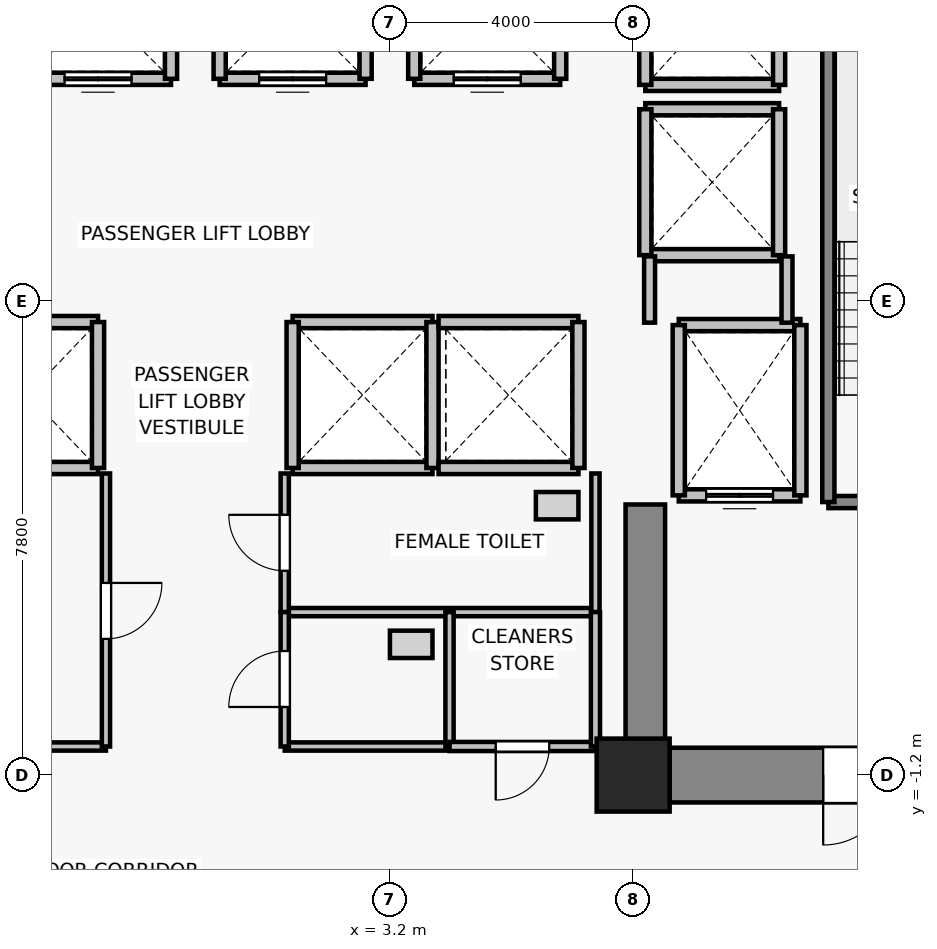
"""IFC4 building model, lengths in metres.
Left out: names, types, materials, properties, quantities, classifications, styles, units other than length and angle.
Written with IfcOpenShell. Run it as: python <this file> out.ifc"""

import sys

from ifc_helpers import new_model, si_unit, direction, frame, frame_2d, origin, origin_2d, place, context, subcontext, project, spatial, rectangle, extrude, source, transform, mapped, element, fill, save


model = new_model("IFC4")
c1 = context("Model", 3, precision=1e-05, world=origin(), true_north=direction((0.0, 1.0)))
c2 = subcontext(c1, "Body", "Model", "MODEL_VIEW")
j1 = project(units=[si_unit("LENGTHUNIT", "METRE"), si_unit("PLANEANGLEUNIT", "RADIAN")], contexts=[c1])
p1 = place(None, origin())
s1 = spatial("IfcSite", under=j1, at=p1, CompositionType="ELEMENT")
p2 = place(p1, origin())
s2 = spatial("IfcBuilding", under=s1, at=p2, CompositionType="ELEMENT")
p3 = place(p2, frame((0.0, 0.0, 60.4)))
s3 = spatial("IfcBuildingStorey", under=s2, at=p3, CompositionType="ELEMENT", Elevation=60.4)
p4 = place(p3, frame((7.2, -1.2, 0.0), z_axis=(0.0, 0.0, 1.0), x_axis=(1.0, 0.0, 0.0)))
e1 = element("IfcColumn", 1, at=p4, inside=s3, PredefinedType="COLUMN", context=c2, shape_type="SweptSolid", body=[
    extrude(rectangle(XDim=1.2, YDim=1.2, at=origin_2d()), origin(), (0.0, 0.0, 1.0), 3.3),
])
p5 = place(p3, frame((13.8, -1.2, 0.0), z_axis=(0.0, 0.0, 1.0), x_axis=(-1.0, 0.0, 0.0)))
e2 = element("IfcWall", 2, at=p5, inside=s3, PredefinedType="SHEAR", context=c2, shape_type="SweptSolid", body=[
    extrude(rectangle(XDim=6.0, YDim=0.9, at=frame_2d((3.0, 0.0))), origin(), (0.0, 0.0, 1.0), 3.075),
])
p6 = place(p5, frame((2.325, 0.0, 0.0)))
e3 = element("IfcOpeningElement", 3, at=p6, cuts=e2, PredefinedType="OPENING", context=c2, shape_type="SweptSolid", body=[
    extrude(rectangle(XDim=1.15, YDim=2.15, at=frame_2d((0.575, 1.075))), frame((0.0, 0.46, 0.0), z_axis=(0.0, -1.0, 0.0), x_axis=(1.0, 0.0, 0.0)), (0.0, 0.0, 1.0), 0.92),
])
p7 = place(p3, frame((7.4, -0.75, 0.0), z_axis=(0.0, 0.0, 1.0), x_axis=(0.0, 1.0, 0.0)))
e4 = element("IfcWall", 4, at=p7, inside=s3, PredefinedType="SHEAR", context=c2, shape_type="SweptSolid", body=[
    extrude(rectangle(XDim=4.0, YDim=0.65, at=frame_2d((2.0, 0.0))), origin(), (0.0, 0.0, 1.0), 3.075),
])
p8 = place(p3, frame((9.95, 3.4, 0.0), z_axis=(0.0, 0.0, 1.0), x_axis=(-1.0, 0.0, 0.0)))
e5 = element("IfcWall", 5, at=p8, inside=s3, PredefinedType="SOLIDWALL", context=c2, shape_type="SweptSolid", body=[
    extrude(rectangle(XDim=2.0, YDim=0.2, at=frame_2d((1.0, 0.0))), origin(), (0.0, 0.0, 1.0), 3.075),
])
p9 = place(p8, frame((0.45, 0.0, 0.0)))
e6 = element("IfcOpeningElement", 6, at=p9, cuts=e5, PredefinedType="OPENING", context=c2, shape_type="SweptSolid", body=[
    extrude(rectangle(XDim=1.1, YDim=2.2, at=frame_2d((0.55, 1.1))), frame((0.0, 0.11, 0.0), z_axis=(0.0, -1.0, 0.0), x_axis=(1.0, 0.0, 0.0)), (0.0, 0.0, 1.0), 0.22),
])
p10 = place(p3, frame((7.95, 6.2, 0.0), z_axis=(0.0, 0.0, 1.0), x_axis=(1.0, 0.0, 0.0)))
e7 = element("IfcWall", 7, at=p10, inside=s3, PredefinedType="SOLIDWALL", context=c2, shape_type="SweptSolid", body=[
    extrude(rectangle(XDim=2.0, YDim=0.2, at=frame_2d((1.0, 0.0))), origin(), (0.0, 0.0, 1.0), 3.075),
])
for number, where, z_axis, x_axis in (
    (8, (7.95, 3.4, 0.0), (0.0, 0.0, 1.0), (0.0, 1.0, 0.0)),
    (9, (9.95, 6.2, 0.0), (0.0, 0.0, 1.0), (0.0, -1.0, 0.0)),
):
    element("IfcWall", number, at=place(p3, frame(where, z_axis=z_axis, x_axis=x_axis)), inside=s3, PredefinedType="SOLIDWALL", context=c2, shape_type="SweptSolid", body=[
        extrude(rectangle(XDim=2.8, YDim=0.2, at=frame_2d((1.4, 0.0))), origin(), (0.0, 0.0, 1.0), 3.075),
    ])
p11 = place(p3, frame((-0.4, 10.25, 0.0), z_axis=(0.0, 0.0, 1.0), x_axis=(-1.0, 0.0, 0.0)))
e10 = element("IfcWall", 10, at=p11, inside=s3, PredefinedType="SOLIDWALL", context=c2, shape_type="SweptSolid", body=[
    extrude(rectangle(XDim=2.4, YDim=0.2, at=frame_2d((1.2, 0.0))), origin(), (0.0, 0.0, 1.0), 3.075),
])
p12 = place(p11, frame((0.65, 0.0, 0.0)))
e11 = element("IfcOpeningElement", 11, at=p12, cuts=e10, PredefinedType="OPENING", context=c2, shape_type="SweptSolid", body=[
    extrude(rectangle(XDim=1.1, YDim=2.2, at=frame_2d((0.55, 1.1))), frame((0.0, 0.11, 0.0), z_axis=(0.0, -1.0, 0.0), x_axis=(1.0, 0.0, 0.0)), (0.0, 0.0, 1.0), 0.22),
])
p13 = place(p3, frame((-0.4, 12.65, 0.0), z_axis=(0.0, 0.0, 1.0), x_axis=(0.0, -1.0, 0.0)))
e12 = element("IfcWall", 12, at=p13, inside=s3, PredefinedType="SOLIDWALL", context=c2, shape_type="SweptSolid", body=[
    extrude(rectangle(XDim=2.4, YDim=0.2, at=frame_2d((1.2, 0.0))), origin(), (0.0, 0.0, 1.0), 3.075),
])
p14 = place(p3, frame((2.8, 10.25, 0.0), z_axis=(0.0, 0.0, 1.0), x_axis=(-1.0, 0.0, 0.0)))
e13 = element("IfcWall", 13, at=p14, inside=s3, PredefinedType="SOLIDWALL", context=c2, shape_type="SweptSolid", body=[
    extrude(rectangle(XDim=2.4, YDim=0.2, at=frame_2d((1.2, 0.0))), origin(), (0.0, 0.0, 1.0), 3.075),
])
p15 = place(p14, frame((0.65, 0.0, 0.0)))
e14 = element("IfcOpeningElement", 14, at=p15, cuts=e13, PredefinedType="OPENING", context=c2, shape_type="SweptSolid", body=[
    extrude(rectangle(XDim=1.1, YDim=2.2, at=frame_2d((0.55, 1.1))), frame((0.0, 0.11, 0.0), z_axis=(0.0, -1.0, 0.0), x_axis=(1.0, 0.0, 0.0)), (0.0, 0.0, 1.0), 0.22),
])
for number, where, z_axis, x_axis in (
    (15, (0.4, 10.25, 0.0), (0.0, 0.0, 1.0), (0.0, 1.0, 0.0)),
    (16, (2.8, 12.65, 0.0), (0.0, 0.0, 1.0), (0.0, -1.0, 0.0)),
):
    element("IfcWall", number, at=place(p3, frame(where, z_axis=z_axis, x_axis=x_axis)), inside=s3, PredefinedType="SOLIDWALL", context=c2, shape_type="SweptSolid", body=[
        extrude(rectangle(XDim=2.4, YDim=0.2, at=frame_2d((1.2, 0.0))), origin(), (0.0, 0.0, 1.0), 3.075),
    ])
p16 = place(p3, frame((6.0, 10.25, 0.0), z_axis=(0.0, 0.0, 1.0), x_axis=(-1.0, 0.0, 0.0)))
e17 = element("IfcWall", 17, at=p16, inside=s3, PredefinedType="SOLIDWALL", context=c2, shape_type="SweptSolid", body=[
    extrude(rectangle(XDim=2.4, YDim=0.2, at=frame_2d((1.2, 0.0))), origin(), (0.0, 0.0, 1.0), 3.075),
])
p17 = place(p16, frame((0.65, 0.0, 0.0)))
e18 = element("IfcOpeningElement", 18, at=p17, cuts=e17, PredefinedType="OPENING", context=c2, shape_type="SweptSolid", body=[
    extrude(rectangle(XDim=1.1, YDim=2.2, at=frame_2d((0.55, 1.1))), frame((0.0, 0.11, 0.0), z_axis=(0.0, -1.0, 0.0), x_axis=(1.0, 0.0, 0.0)), (0.0, 0.0, 1.0), 0.22),
])
for number, where, z_axis, x_axis in (
    (19, (3.6, 10.25, 0.0), (0.0, 0.0, 1.0), (0.0, 1.0, 0.0)),
    (20, (6.0, 12.65, 0.0), (0.0, 0.0, 1.0), (0.0, -1.0, 0.0)),
):
    element("IfcWall", number, at=place(p3, frame(where, z_axis=z_axis, x_axis=x_axis)), inside=s3, PredefinedType="SOLIDWALL", context=c2, shape_type="SweptSolid", body=[
        extrude(rectangle(XDim=2.4, YDim=0.2, at=frame_2d((1.2, 0.0))), origin(), (0.0, 0.0, 1.0), 3.075),
    ])
for number, where, z_axis, x_axis in (
    (21, (-1.6, 3.85, 0.0), (0.0, 0.0, 1.0), (-1.0, 0.0, 0.0)),
    (22, (-3.9, 6.25, 0.0), (0.0, 0.0, 1.0), (1.0, 0.0, 0.0)),
):
    element("IfcWall", number, at=place(p3, frame(where, z_axis=z_axis, x_axis=x_axis)), inside=s3, PredefinedType="SOLIDWALL", context=c2, shape_type="SweptSolid", body=[
        extrude(rectangle(XDim=2.3, YDim=0.2, at=frame_2d((1.15, 0.0))), origin(), (0.0, 0.0, 1.0), 3.075),
    ])
p18 = place(p3, frame((-1.6, 6.25, 0.0), z_axis=(0.0, 0.0, 1.0), x_axis=(0.0, -1.0, 0.0)))
e23 = element("IfcWall", 23, at=p18, inside=s3, PredefinedType="SOLIDWALL", context=c2, shape_type="SweptSolid", body=[
    extrude(rectangle(XDim=2.4, YDim=0.2, at=frame_2d((1.2, 0.0))), origin(), (0.0, 0.0, 1.0), 3.075),
])
for number, where, z_axis, x_axis in (
    (24, (3.9, 3.85, 0.0), (0.0, 0.0, 1.0), (-1.0, 0.0, 0.0)),
    (25, (1.6, 6.25, 0.0), (0.0, 0.0, 1.0), (1.0, 0.0, 0.0)),
):
    element("IfcWall", number, at=place(p3, frame(where, z_axis=z_axis, x_axis=x_axis)), inside=s3, PredefinedType="SOLIDWALL", context=c2, shape_type="SweptSolid", body=[
        extrude(rectangle(XDim=2.3, YDim=0.2, at=frame_2d((1.15, 0.0))), origin(), (0.0, 0.0, 1.0), 3.075),
    ])
for number, where, z_axis, x_axis in (
    (26, (1.6, 3.85, 0.0), (0.0, 0.0, 1.0), (0.0, 1.0, 0.0)),
    (27, (3.9, 6.25, 0.0), (0.0, 0.0, 1.0), (0.0, -1.0, 0.0)),
):
    element("IfcWall", number, at=place(p3, frame(where, z_axis=z_axis, x_axis=x_axis)), inside=s3, PredefinedType="SOLIDWALL", context=c2, shape_type="SweptSolid", body=[
        extrude(rectangle(XDim=2.4, YDim=0.2, at=frame_2d((1.2, 0.0))), origin(), (0.0, 0.0, 1.0), 3.075),
    ])
for number, where, z_axis, x_axis in (
    (28, (6.3, 3.85, 0.0), (0.0, 0.0, 1.0), (-1.0, 0.0, 0.0)),
    (29, (4.0, 6.25, 0.0), (0.0, 0.0, 1.0), (1.0, 0.0, 0.0)),
):
    element("IfcWall", number, at=place(p3, frame(where, z_axis=z_axis, x_axis=x_axis)), inside=s3, PredefinedType="SOLIDWALL", context=c2, shape_type="SweptSolid", body=[
        extrude(rectangle(XDim=2.3, YDim=0.2, at=frame_2d((1.15, 0.0))), origin(), (0.0, 0.0, 1.0), 3.075),
    ])
p19 = place(p3, frame((6.3, 6.25, 0.0), z_axis=(0.0, 0.0, 1.0), x_axis=(0.0, -1.0, 0.0)))
e30 = element("IfcWall", 30, at=p19, inside=s3, PredefinedType="SOLIDWALL", context=c2, shape_type="SweptSolid", body=[
    extrude(rectangle(XDim=2.4, YDim=0.2, at=frame_2d((1.2, 0.0))), origin(), (0.0, 0.0, 1.0), 3.075),
])
for number, where, z_axis, x_axis in (
    (31, (9.6, 7.35, 0.0), (0.0, 0.0, 1.0), (-1.0, 0.0, 0.0)),
    (32, (7.4, 9.75, 0.0), (0.0, 0.0, 1.0), (1.0, 0.0, 0.0)),
):
    element("IfcWall", number, at=place(p3, frame(where, z_axis=z_axis, x_axis=x_axis)), inside=s3, PredefinedType="SOLIDWALL", context=c2, shape_type="SweptSolid", body=[
        extrude(rectangle(XDim=2.2, YDim=0.2, at=frame_2d((1.1, 0.0))), origin(), (0.0, 0.0, 1.0), 2.465),
    ])
p20 = place(p3, frame((7.4, 7.35, 0.0), z_axis=(0.0, 0.0, 1.0), x_axis=(0.0, 1.0, 0.0)))
e33 = element("IfcWall", 33, at=p20, inside=s3, PredefinedType="SOLIDWALL", context=c2, shape_type="SweptSolid", body=[
    extrude(rectangle(XDim=2.4, YDim=0.2, at=frame_2d((1.2, 0.0))), origin(), (0.0, 0.0, 1.0), 2.465),
])
p21 = place(p3, frame((9.6, 9.75, 0.0), z_axis=(0.0, 0.0, 1.0), x_axis=(0.0, -1.0, 0.0)))
e34 = element("IfcWall", 34, at=p21, inside=s3, PredefinedType="SOLIDWALL", context=c2, shape_type="SweptSolid", body=[
    extrude(rectangle(XDim=2.4, YDim=0.2, at=frame_2d((1.2, 0.0))), origin(), (0.0, 0.0, 1.0), 3.075),
])
p22 = place(p3, frame((9.6, 10.15, 0.0), z_axis=(0.0, 0.0, 1.0), x_axis=(-1.0, 0.0, 0.0)))
e35 = element("IfcWall", 35, at=p22, inside=s3, PredefinedType="SOLIDWALL", context=c2, shape_type="SweptSolid", body=[
    extrude(rectangle(XDim=2.2, YDim=0.2, at=frame_2d((1.1, 0.0))), origin(), (0.0, 0.0, 1.0), 2.465),
])
p23 = place(p3, frame((7.4, 10.15, 0.0), z_axis=(0.0, 0.0, 1.0), x_axis=(0.0, 1.0, 0.0)))
e36 = element("IfcWall", 36, at=p23, inside=s3, PredefinedType="SOLIDWALL", context=c2, shape_type="SweptSolid", body=[
    extrude(rectangle(XDim=2.4, YDim=0.2, at=frame_2d((1.2, 0.0))), origin(), (0.0, 0.0, 1.0), 2.465),
])
p24 = place(p3, frame((9.6, 12.55, 0.0), z_axis=(0.0, 0.0, 1.0), x_axis=(0.0, -1.0, 0.0)))
e37 = element("IfcWall", 37, at=p24, inside=s3, PredefinedType="SOLIDWALL", context=c2, shape_type="SweptSolid", body=[
    extrude(rectangle(XDim=2.4, YDim=0.2, at=frame_2d((1.2, 0.0))), origin(), (0.0, 0.0, 1.0), 3.075),
])
p25 = place(p3, frame((13.93, 3.29, 0.0), z_axis=(0.0, 0.0, 1.0), x_axis=(-1.0, 0.0, 0.0)))
e38 = element("IfcWall", 38, at=p25, inside=s3, PredefinedType="SOLIDWALL", context=c2, shape_type="SweptSolid", body=[
    extrude(rectangle(XDim=3.52, YDim=0.2, at=frame_2d((1.76, 0.0))), origin(), (0.0, 0.0, 1.0), 3.075),
])
p26 = place(p25, frame((1.205, 0.0, 0.0)))
e39 = element("IfcOpeningElement", 39, at=p26, cuts=e38, PredefinedType="OPENING", context=c2, shape_type="SweptSolid", body=[
    extrude(rectangle(XDim=1.15, YDim=2.15, at=frame_2d((0.575, 1.075))), frame((0.0, 0.11, 0.0), z_axis=(0.0, -1.0, 0.0), x_axis=(1.0, 0.0, 0.0)), (0.0, 0.0, 1.0), 0.22),
])
p27 = place(p3, frame((10.41, 3.29, 0.0), z_axis=(0.0, 0.0, 1.0), x_axis=(0.0, 1.0, 0.0)))
e40 = element("IfcWall", 40, at=p27, inside=s3, PredefinedType="SOLIDWALL", context=c2, shape_type="SweptSolid", body=[
    extrude(rectangle(XDim=8.84, YDim=0.2, at=frame_2d((4.42, 0.0))), origin(), (0.0, 0.0, 1.0), 3.075),
])
p28 = place(p3, frame((7.47, 6.24, 0.0), z_axis=(0.0, 0.0, 1.0), x_axis=(0.0, 1.0, 0.0)))
e41 = element("IfcWall", 41, at=p28, inside=s3, PredefinedType="PARTITIONING", context=c2, shape_type="SweptSolid", body=[
    extrude(rectangle(XDim=1.09, YDim=0.18, at=frame_2d((0.545, 0.0))), origin(), (0.0, 0.0, 1.0), 2.465),
])
p29 = place(p3, frame((9.73, 7.33, 0.0), z_axis=(0.0, 0.0, 1.0), x_axis=(0.0, -1.0, 0.0)))
e42 = element("IfcWall", 42, at=p29, inside=s3, PredefinedType="PARTITIONING", context=c2, shape_type="SweptSolid", body=[
    extrude(rectangle(XDim=1.09, YDim=0.18, at=frame_2d((0.545, 0.0))), origin(), (0.0, 0.0, 1.0), 3.075),
])
p30 = place(p3, frame((-1.47, -0.73, 0.0), z_axis=(0.0, 0.0, 1.0), x_axis=(-1.0, 0.0, 0.0)))
e43 = element("IfcWall", 43, at=p30, inside=s3, PredefinedType="PARTITIONING", context=c2, shape_type="SweptSolid", body=[
    extrude(rectangle(XDim=5.11, YDim=0.135, at=frame_2d((2.555, 0.0))), origin(), (0.0, 0.0, 1.0), 3.075),
])
p31 = place(p3, frame((-1.47, 3.76, 0.0), z_axis=(0.0, 0.0, 1.0), x_axis=(0.0, -1.0, 0.0)))
e44 = element("IfcWall", 44, at=p31, inside=s3, PredefinedType="PARTITIONING", context=c2, shape_type="SweptSolid", body=[
    extrude(rectangle(XDim=4.49, YDim=0.135, at=frame_2d((2.245, 0.0))), origin(), (0.0, 0.0, 1.0), 3.075),
])
p32 = place(p31, frame((1.8, 0.0, 0.0)))
e45 = element("IfcOpeningElement", 45, at=p32, cuts=e44, PredefinedType="OPENING", context=c2, shape_type="SweptSolid", body=[
    extrude(rectangle(XDim=0.92, YDim=2.1, at=frame_2d((0.46, 1.05))), frame((0.0, 0.077, 0.0), z_axis=(0.0, -1.0, 0.0), x_axis=(1.0, 0.0, 0.0)), (0.0, 0.0, 1.0), 0.155),
])
p33 = place(p3, frame((6.58, 1.48, 0.0), z_axis=(0.0, 0.0, 1.0), x_axis=(-1.0, 0.0, 0.0)))
e46 = element("IfcWall", 46, at=p33, inside=s3, PredefinedType="PARTITIONING", context=c2, shape_type="SweptSolid", body=[
    extrude(rectangle(XDim=5.11, YDim=0.135, at=frame_2d((2.555, 0.0))), origin(), (0.0, 0.0, 1.0), 3.075),
])
p34 = place(p3, frame((1.47, 1.48, 0.0), z_axis=(0.0, 0.0, 1.0), x_axis=(0.0, 1.0, 0.0)))
e47 = element("IfcWall", 47, at=p34, inside=s3, PredefinedType="PARTITIONING", context=c2, shape_type="SweptSolid", body=[
    extrude(rectangle(XDim=2.28, YDim=0.135, at=frame_2d((1.14, 0.0))), origin(), (0.0, 0.0, 1.0), 3.075),
])
p35 = place(p34, frame((0.68, 0.0, 0.0)))
e48 = element("IfcOpeningElement", 48, at=p35, cuts=e47, PredefinedType="OPENING", context=c2, shape_type="SweptSolid", body=[
    extrude(rectangle(XDim=0.92, YDim=2.1, at=frame_2d((0.46, 1.05))), frame((0.0, 0.077, 0.0), z_axis=(0.0, -1.0, 0.0), x_axis=(1.0, 0.0, 0.0)), (0.0, 0.0, 1.0), 0.155),
])
p36 = place(p3, frame((6.58, 3.76, 0.0), z_axis=(0.0, 0.0, 1.0), x_axis=(0.0, -1.0, 0.0)))
e49 = element("IfcWall", 49, at=p36, inside=s3, PredefinedType="PARTITIONING", context=c2, shape_type="SweptSolid", body=[
    extrude(rectangle(XDim=2.28, YDim=0.135, at=frame_2d((1.14, 0.0))), origin(), (0.0, 0.0, 1.0), 3.075),
])
p37 = place(p3, frame((4.18, -0.73, 0.0), z_axis=(0.0, 0.0, 1.0), x_axis=(-1.0, 0.0, 0.0)))
e50 = element("IfcWall", 50, at=p37, inside=s3, PredefinedType="PARTITIONING", context=c2, shape_type="SweptSolid", body=[
    extrude(rectangle(XDim=2.71, YDim=0.135, at=frame_2d((1.355, 0.0))), origin(), (0.0, 0.0, 1.0), 3.075),
])
p38 = place(p3, frame((1.47, -0.73, 0.0), z_axis=(0.0, 0.0, 1.0), x_axis=(0.0, 1.0, 0.0)))
e51 = element("IfcWall", 51, at=p38, inside=s3, PredefinedType="PARTITIONING", context=c2, shape_type="SweptSolid", body=[
    extrude(rectangle(XDim=2.21, YDim=0.135, at=frame_2d((1.105, 0.0))), origin(), (0.0, 0.0, 1.0), 3.075),
])
p39 = place(p38, frame((0.65, 0.0, 0.0)))
e52 = element("IfcOpeningElement", 52, at=p39, cuts=e51, PredefinedType="OPENING", context=c2, shape_type="SweptSolid", body=[
    extrude(rectangle(XDim=0.92, YDim=2.1, at=frame_2d((0.46, 1.05))), frame((0.0, 0.077, 0.0), z_axis=(0.0, -1.0, 0.0), x_axis=(1.0, 0.0, 0.0)), (0.0, 0.0, 1.0), 0.155),
])
p40 = place(p3, frame((4.18, 1.48, 0.0), z_axis=(0.0, 0.0, 1.0), x_axis=(0.0, -1.0, 0.0)))
e53 = element("IfcWall", 53, at=p40, inside=s3, PredefinedType="PARTITIONING", context=c2, shape_type="SweptSolid", body=[
    extrude(rectangle(XDim=2.21, YDim=0.135, at=frame_2d((1.105, 0.0))), origin(), (0.0, 0.0, 1.0), 3.075),
])
p41 = place(p3, frame((6.58, -0.73, 0.0), z_axis=(0.0, 0.0, 1.0), x_axis=(-1.0, 0.0, 0.0)))
e54 = element("IfcWall", 54, at=p41, inside=s3, PredefinedType="PARTITIONING", context=c2, shape_type="SweptSolid", body=[
    extrude(rectangle(XDim=2.4, YDim=0.15, at=frame_2d((1.2, 0.0))), origin(), (0.0, 0.0, 1.0), 3.075),
])
p42 = place(p41, frame((0.76, 0.0, 0.0)))
e55 = element("IfcOpeningElement", 55, at=p42, cuts=e54, PredefinedType="OPENING", context=c2, shape_type="SweptSolid", body=[
    extrude(rectangle(XDim=0.88, YDim=2.1, at=frame_2d((0.44, 1.05))), frame((0.0, 0.085, 0.0), z_axis=(0.0, -1.0, 0.0), x_axis=(1.0, 0.0, 0.0)), (0.0, 0.0, 1.0), 0.17),
])
p43 = place(p3, frame((6.58, 1.48, 0.0), z_axis=(0.0, 0.0, 1.0), x_axis=(0.0, -1.0, 0.0)))
e56 = element("IfcWall", 56, at=p43, inside=s3, PredefinedType="PARTITIONING", context=c2, shape_type="SweptSolid", body=[
    extrude(rectangle(XDim=2.21, YDim=0.15, at=frame_2d((1.105, 0.0))), origin(), (0.0, 0.0, 1.0), 3.075),
])
m1 = source(origin(), c2, "Body", "SweptSolid", [
    extrude(rectangle(XDim=1.1, YDim=2.2, at=frame_2d((0.55, 1.1))), frame((0.0, 0.025, 0.0), z_axis=(0.0, -1.0, 0.0), x_axis=(1.0, 0.0, 0.0)), (0.0, 0.0, 1.0), 0.05),
])
p44 = place(p9, origin())
e57 = element("IfcDoor", 57, at=p44, inside=s3, OperationType="DOUBLE_DOOR_SLIDING", PredefinedType="DOOR", context=c2, shape_type="MappedRepresentation", body=[
    mapped(m1, transform((0.0, 0.0, 0.0), x_axis=(1.0, 0.0, 0.0), y_axis=(0.0, 1.0, 0.0), z_axis=(0.0, 0.0, 1.0), scale=1.0)),
])
fill(e6, e57)
p45 = place(p12, origin())
e58 = element("IfcDoor", 58, at=p45, inside=s3, OperationType="DOUBLE_DOOR_SLIDING", PredefinedType="DOOR", context=c2, shape_type="MappedRepresentation", body=[
    mapped(m1, transform((0.0, 0.0, 0.0), x_axis=(1.0, 0.0, 0.0), y_axis=(0.0, 1.0, 0.0), z_axis=(0.0, 0.0, 1.0), scale=1.0)),
])
fill(e11, e58)
p46 = place(p15, origin())
e59 = element("IfcDoor", 59, at=p46, inside=s3, OperationType="DOUBLE_DOOR_SLIDING", PredefinedType="DOOR", context=c2, shape_type="MappedRepresentation", body=[
    mapped(m1, transform((0.0, 0.0, 0.0), x_axis=(1.0, 0.0, 0.0), y_axis=(0.0, 1.0, 0.0), z_axis=(0.0, 0.0, 1.0), scale=1.0)),
])
fill(e14, e59)
p47 = place(p17, origin())
e60 = element("IfcDoor", 60, at=p47, inside=s3, OperationType="DOUBLE_DOOR_SLIDING", PredefinedType="DOOR", context=c2, shape_type="MappedRepresentation", body=[
    mapped(m1, transform((0.0, 0.0, 0.0), x_axis=(1.0, 0.0, 0.0), y_axis=(0.0, 1.0, 0.0), z_axis=(0.0, 0.0, 1.0), scale=1.0)),
])
fill(e18, e60)
m2 = source(origin(), c2, "Body", "SweptSolid", [
    extrude(rectangle(XDim=1.15, YDim=2.15, at=frame_2d((0.575, 1.075))), frame((0.0, 0.025, 0.0), z_axis=(0.0, -1.0, 0.0), x_axis=(1.0, 0.0, 0.0)), (0.0, 0.0, 1.0), 0.05),
])
p48 = place(p6, origin())
e61 = element("IfcDoor", 61, at=p48, inside=s3, OperationType="SINGLE_SWING_RIGHT", PredefinedType="DOOR", context=c2, shape_type="MappedRepresentation", body=[
    mapped(m2, transform((0.0, 0.0, 0.0), x_axis=(1.0, 0.0, 0.0), y_axis=(0.0, 1.0, 0.0), z_axis=(0.0, 0.0, 1.0), scale=1.0)),
])
fill(e3, e61)
m3 = source(origin(), c2, "Body", "SweptSolid", [
    extrude(rectangle(XDim=0.92, YDim=2.1, at=frame_2d((0.46, 1.05))), frame((0.0, 0.025, 0.0), z_axis=(0.0, -1.0, 0.0), x_axis=(1.0, 0.0, 0.0)), (0.0, 0.0, 1.0), 0.05),
])
p49 = place(p32, origin())
e62 = element("IfcDoor", 62, at=p49, inside=s3, OperationType="SINGLE_SWING_LEFT", PredefinedType="DOOR", context=c2, shape_type="MappedRepresentation", body=[
    mapped(m3, transform((0.0, 0.0, 0.0), x_axis=(1.0, 0.0, 0.0), y_axis=(0.0, 1.0, 0.0), z_axis=(0.0, 0.0, 1.0), scale=1.0)),
])
fill(e45, e62)
p50 = place(p35, origin())
e63 = element("IfcDoor", 63, at=p50, inside=s3, OperationType="SINGLE_SWING_RIGHT", PredefinedType="DOOR", context=c2, shape_type="MappedRepresentation", body=[
    mapped(m3, transform((0.0, 0.0, 0.0), x_axis=(1.0, 0.0, 0.0), y_axis=(0.0, 1.0, 0.0), z_axis=(0.0, 0.0, 1.0), scale=1.0)),
])
fill(e48, e63)
p51 = place(p39, origin())
e64 = element("IfcDoor", 64, at=p51, inside=s3, OperationType="SINGLE_SWING_LEFT", PredefinedType="DOOR", context=c2, shape_type="MappedRepresentation", body=[
    mapped(m3, transform((0.0, 0.0, 0.0), x_axis=(1.0, 0.0, 0.0), y_axis=(0.0, 1.0, 0.0), z_axis=(0.0, 0.0, 1.0), scale=1.0)),
])
fill(e52, e64)
m4 = source(origin(), c2, "Body", "SweptSolid", [
    extrude(rectangle(XDim=0.88, YDim=2.1, at=frame_2d((0.44, 1.05))), frame((0.0, 0.025, 0.0), z_axis=(0.0, -1.0, 0.0), x_axis=(1.0, 0.0, 0.0)), (0.0, 0.0, 1.0), 0.05),
])
p52 = place(p42, origin())
e65 = element("IfcDoor", 65, at=p52, inside=s3, OperationType="SINGLE_SWING_RIGHT", PredefinedType="DOOR", context=c2, shape_type="MappedRepresentation", body=[
    mapped(m4, transform((0.0, 0.0, 0.0), x_axis=(1.0, 0.0, 0.0), y_axis=(0.0, 1.0, 0.0), z_axis=(0.0, 0.0, 1.0), scale=1.0)),
])
fill(e55, e65)
save(model, sys.argv[1])
